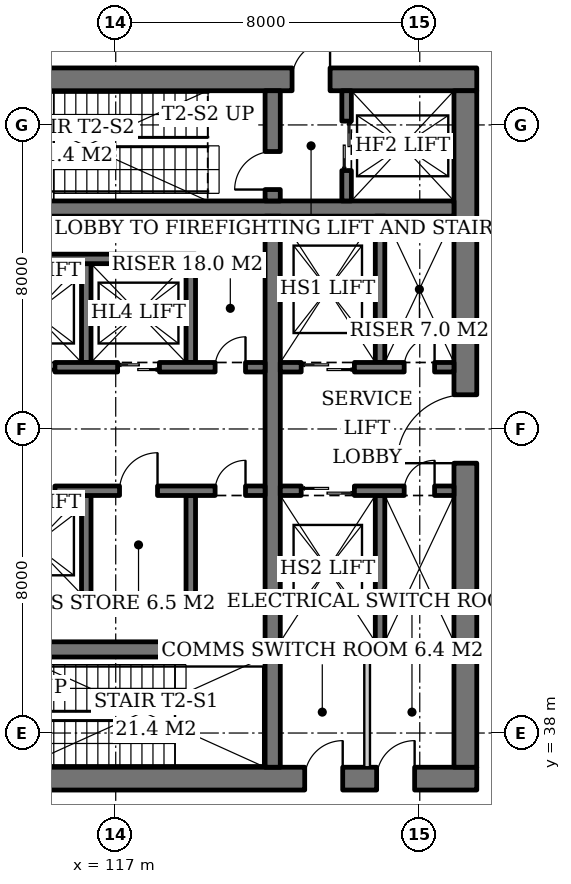
"""IFC4 building model, lengths in metres.
Left out: names, types, materials, properties, quantities, classifications, styles, units other than length and angle.
Written with IfcOpenShell. Run it as: python <this file> out.ifc"""

import sys

from ifc_helpers import new_model, si_unit, direction, frame, frame_2d, origin, place, context, subcontext, project, spatial, rectangle, extrude, element, fill, save


model = new_model("IFC4")
c1 = context("Model", 3, precision=1e-05, world=origin(), true_north=direction((0.0, 1.0)))
c2 = subcontext(c1, "Body", "Model", "MODEL_VIEW")
j1 = project(units=[si_unit("LENGTHUNIT", "METRE"), si_unit("PLANEANGLEUNIT", "RADIAN")], contexts=[c1])
p1 = place(None, origin())
s1 = spatial("IfcSite", under=j1, at=p1, CompositionType="ELEMENT")
p2 = place(p1, origin())
s2 = spatial("IfcBuilding", under=s1, at=p2, CompositionType="ELEMENT")
p3 = place(p2, frame((0.0, 0.0, -5.0)))
s3 = spatial("IfcBuildingStorey", under=s2, at=p3, CompositionType="ELEMENT", Elevation=-5.0)
p4 = place(p3, frame((107.5, 36.8, 0.0), z_axis=(0.0, 0.0, 1.0), x_axis=(1.0, 0.0, 0.0)))
e1 = element("IfcWall", 1, at=p4, inside=s3, PredefinedType="SHEAR", context=c2, shape_type="SweptSolid", body=[
    extrude(rectangle(XDim=19.0, YDim=0.6, at=frame_2d((9.5, 0.0))), origin(), (0.0, 0.0, 1.0), 5.0),
])
p5 = place(p4, frame((3.9, 0.0, 0.0)))
e2 = element("IfcOpeningElement", 2, at=p5, cuts=e1, PredefinedType="OPENING", context=c2, shape_type="SweptSolid", body=[
    extrude(rectangle(XDim=1.0, YDim=2.1, at=frame_2d((0.5, 1.05))), frame((0.0, 0.31, 0.0), z_axis=(0.0, -1.0, 0.0), x_axis=(1.0, 0.0, 0.0)), (0.0, 0.0, 1.0), 0.62),
])
p6 = place(p4, frame((14.472, 0.0, 0.0)))
e3 = element("IfcOpeningElement", 3, at=p6, cuts=e1, PredefinedType="OPENING", context=c2, shape_type="SweptSolid", body=[
    extrude(rectangle(XDim=1.0, YDim=2.1, at=frame_2d((0.5, 1.05))), frame((0.0, 0.31, 0.0), z_axis=(0.0, -1.0, 0.0), x_axis=(1.0, 0.0, 0.0)), (0.0, 0.0, 1.0), 0.62),
])
p7 = place(p4, frame((16.365, 0.0, 0.0)))
e4 = element("IfcOpeningElement", 4, at=p7, cuts=e1, PredefinedType="OPENING", context=c2, shape_type="SweptSolid", body=[
    extrude(rectangle(XDim=1.0, YDim=2.1, at=frame_2d((0.5, 1.05))), frame((0.0, 0.31, 0.0), z_axis=(0.0, -1.0, 0.0), x_axis=(1.0, 0.0, 0.0)), (0.0, 0.0, 1.0), 0.62),
])
p8 = place(p3, frame((107.5, 55.2, 0.0), z_axis=(0.0, 0.0, 1.0), x_axis=(1.0, 0.0, 0.0)))
e5 = element("IfcWall", 5, at=p8, inside=s3, PredefinedType="SHEAR", context=c2, shape_type="SweptSolid", body=[
    extrude(rectangle(XDim=19.0, YDim=0.6, at=frame_2d((9.5, 0.0))), origin(), (0.0, 0.0, 1.0), 5.0),
])
p9 = place(p8, frame((14.14, 0.0, 0.0)))
e6 = element("IfcOpeningElement", 6, at=p9, cuts=e5, PredefinedType="OPENING", context=c2, shape_type="SweptSolid", body=[
    extrude(rectangle(XDim=1.0, YDim=2.1, at=frame_2d((0.5, 1.05))), frame((0.0, 0.31, 0.0), z_axis=(0.0, -1.0, 0.0), x_axis=(1.0, 0.0, 0.0)), (0.0, 0.0, 1.0), 0.62),
])
p10 = place(p8, frame((2.425, 0.0, 0.0)))
e7 = element("IfcOpeningElement", 7, at=p10, cuts=e5, PredefinedType="OPENING", context=c2, shape_type="SweptSolid", body=[
    extrude(rectangle(XDim=1.0, YDim=2.1, at=frame_2d((0.5, 1.05))), frame((0.0, 0.31, 0.0), z_axis=(0.0, -1.0, 0.0), x_axis=(1.0, 0.0, 0.0)), (0.0, 0.0, 1.0), 0.62),
])
p11 = place(p3, frame((126.2, 37.1, 0.0), z_axis=(0.0, 0.0, 1.0), x_axis=(0.0, 1.0, 0.0)))
e8 = element("IfcWall", 8, at=p11, inside=s3, PredefinedType="SHEAR", context=c2, shape_type="SweptSolid", body=[
    extrude(rectangle(XDim=17.8, YDim=0.6, at=frame_2d((8.9, 0.0))), origin(), (0.0, 0.0, 1.0), 5.0),
])
p12 = place(p11, frame((8.0, 0.0, 0.0)))
e9 = element("IfcOpeningElement", 9, at=p12, cuts=e8, PredefinedType="OPENING", context=c2, shape_type="SweptSolid", body=[
    extrude(rectangle(XDim=1.8, YDim=2.4, at=frame_2d((0.9, 1.2))), frame((0.0, 0.31, 0.0), z_axis=(0.0, -1.0, 0.0), x_axis=(1.0, 0.0, 0.0)), (0.0, 0.0, 1.0), 0.62),
])
for number, where, z_axis, x_axis in (
    (10, (108.1, 40.2, 0.0), (0.0, 0.0, 1.0), (1.0, 0.0, 0.0)),
    (11, (108.1, 51.8, 0.0), (0.0, 0.0, 1.0), (1.0, 0.0, 0.0)),
):
    element("IfcWall", number, at=place(p3, frame(where, z_axis=z_axis, x_axis=x_axis)), inside=s3, PredefinedType="SHEAR", context=c2, shape_type="SweptSolid", body=[
        extrude(rectangle(XDim=17.8, YDim=0.4, at=frame_2d((8.9, 0.0))), origin(), (0.0, 0.0, 1.0), 5.0),
    ])
p13 = place(p3, frame((121.13, 37.1, 0.0), z_axis=(0.0, 0.0, 1.0), x_axis=(0.0, 1.0, 0.0)))
e12 = element("IfcWall", 12, at=p13, inside=s3, PredefinedType="SHEAR", context=c2, shape_type="SweptSolid", body=[
    extrude(rectangle(XDim=2.9, YDim=0.4, at=frame_2d((1.45, 0.0))), origin(), (0.0, 0.0, 1.0), 5.0),
])
p14 = place(p3, frame((121.13, 40.4, 0.0), z_axis=(0.0, 0.0, 1.0), x_axis=(0.0, 1.0, 0.0)))
e13 = element("IfcWall", 13, at=p14, inside=s3, PredefinedType="SHEAR", context=c2, shape_type="SweptSolid", body=[
    extrude(rectangle(XDim=11.2, YDim=0.4, at=frame_2d((5.6, 0.0))), origin(), (0.0, 0.0, 1.0), 5.0),
])
p15 = place(p3, frame((121.13, 52.0, 0.0), z_axis=(0.0, 0.0, 1.0), x_axis=(0.0, 1.0, 0.0)))
e14 = element("IfcWall", 14, at=p15, inside=s3, PredefinedType="SHEAR", context=c2, shape_type="SweptSolid", body=[
    extrude(rectangle(XDim=2.9, YDim=0.4, at=frame_2d((1.45, 0.0))), origin(), (0.0, 0.0, 1.0), 5.0),
])
p16 = place(p15, frame((0.3, 0.0, 0.0)))
e15 = element("IfcOpeningElement", 15, at=p16, cuts=e14, PredefinedType="OPENING", context=c2, shape_type="SweptSolid", body=[
    extrude(rectangle(XDim=1.0, YDim=2.1, at=frame_2d((0.5, 1.05))), frame((0.0, 0.21, 0.0), z_axis=(0.0, -1.0, 0.0), x_axis=(1.0, 0.0, 0.0)), (0.0, 0.0, 1.0), 0.42),
])
p17 = place(p3, frame((123.075, 52.0, 0.0), z_axis=(0.0, 0.0, 1.0), x_axis=(0.0, 1.0, 0.0)))
e16 = element("IfcWall", 16, at=p17, inside=s3, PredefinedType="SHEAR", context=c2, shape_type="SweptSolid", body=[
    extrude(rectangle(XDim=2.9, YDim=0.25, at=frame_2d((1.45, 0.0))), origin(), (0.0, 0.0, 1.0), 5.0),
])
p18 = place(p17, frame((0.8, 0.0, 0.0)))
e17 = element("IfcOpeningElement", 17, at=p18, cuts=e16, PredefinedType="OPENING", context=c2, shape_type="SweptSolid", body=[
    extrude(rectangle(XDim=1.3, YDim=2.2, at=frame_2d((0.65, 1.1))), frame((0.0, 0.135, 0.0), z_axis=(0.0, -1.0, 0.0), x_axis=(1.0, 0.0, 0.0)), (0.0, 0.0, 1.0), 0.27),
])
for number, where, z_axis, x_axis in (
    (18, (116.225, 47.75, 0.0), (0.0, 0.0, 1.0), (0.0, 1.0, 0.0)),
    (19, (118.975, 47.75, 0.0), (0.0, 0.0, 1.0), (0.0, 1.0, 0.0)),
):
    element("IfcWall", number, at=place(p3, frame(where, z_axis=z_axis, x_axis=x_axis)), inside=s3, PredefinedType="SHEAR", context=c2, shape_type="SweptSolid", body=[
        extrude(rectangle(XDim=2.6, YDim=0.25, at=frame_2d((1.3, 0.0))), origin(), (0.0, 0.0, 1.0), 5.0),
    ])
p19 = place(p3, frame((108.1, 50.475, 0.0), z_axis=(0.0, 0.0, 1.0), x_axis=(1.0, 0.0, 0.0)))
e20 = element("IfcWall", 20, at=p19, inside=s3, PredefinedType="SHEAR", context=c2, shape_type="SweptSolid", body=[
    extrude(rectangle(XDim=11.0, YDim=0.25, at=frame_2d((5.5, 0.0))), origin(), (0.0, 0.0, 1.0), 5.0),
])
p20 = place(p3, frame((108.1, 47.625, 0.0), z_axis=(0.0, 0.0, 1.0), x_axis=(1.0, 0.0, 0.0)))
e21 = element("IfcWall", 21, at=p20, inside=s3, PredefinedType="SHEAR", context=c2, shape_type="SweptSolid", body=[
    extrude(rectangle(XDim=12.83, YDim=0.25, at=frame_2d((6.415, 0.0))), origin(), (0.0, 0.0, 1.0), 5.0),
])
p21 = place(p20, frame((0.7, 0.0, 0.0)))
e22 = element("IfcOpeningElement", 22, at=p21, cuts=e21, PredefinedType="OPENING", context=c2, shape_type="SweptSolid", body=[
    extrude(rectangle(XDim=1.1, YDim=2.2, at=frame_2d((0.55, 1.1))), frame((0.0, 0.135, 0.0), z_axis=(0.0, -1.0, 0.0), x_axis=(1.0, 0.0, 0.0)), (0.0, 0.0, 1.0), 0.27),
])
p22 = place(p20, frame((3.45, 0.0, 0.0)))
e23 = element("IfcOpeningElement", 23, at=p22, cuts=e21, PredefinedType="OPENING", context=c2, shape_type="SweptSolid", body=[
    extrude(rectangle(XDim=1.1, YDim=2.2, at=frame_2d((0.55, 1.1))), frame((0.0, 0.135, 0.0), z_axis=(0.0, -1.0, 0.0), x_axis=(1.0, 0.0, 0.0)), (0.0, 0.0, 1.0), 0.27),
])
p23 = place(p20, frame((6.2, 0.0, 0.0)))
e24 = element("IfcOpeningElement", 24, at=p23, cuts=e21, PredefinedType="OPENING", context=c2, shape_type="SweptSolid", body=[
    extrude(rectangle(XDim=1.1, YDim=2.2, at=frame_2d((0.55, 1.1))), frame((0.0, 0.135, 0.0), z_axis=(0.0, -1.0, 0.0), x_axis=(1.0, 0.0, 0.0)), (0.0, 0.0, 1.0), 0.27),
])
p24 = place(p20, frame((8.95, 0.0, 0.0)))
e25 = element("IfcOpeningElement", 25, at=p24, cuts=e21, PredefinedType="OPENING", context=c2, shape_type="SweptSolid", body=[
    extrude(rectangle(XDim=1.1, YDim=2.2, at=frame_2d((0.55, 1.1))), frame((0.0, 0.135, 0.0), z_axis=(0.0, -1.0, 0.0), x_axis=(1.0, 0.0, 0.0)), (0.0, 0.0, 1.0), 0.27),
])
p25 = place(p20, frame((11.515, 0.0, 0.0)))
e26 = element("IfcOpeningElement", 26, at=p25, cuts=e21, PredefinedType="OPENING", context=c2, shape_type="SweptSolid", body=[
    extrude(rectangle(XDim=0.8, YDim=2.0, at=frame_2d((0.4, 1.0))), frame((0.0, 0.135, 0.0), z_axis=(0.0, -1.0, 0.0), x_axis=(1.0, 0.0, 0.0)), (0.0, 0.0, 1.0), 0.27),
])
for number, where, z_axis, x_axis in (
    (27, (116.225, 44.25, 0.0), (0.0, 0.0, 1.0), (0.0, -1.0, 0.0)),
    (28, (118.975, 44.25, 0.0), (0.0, 0.0, 1.0), (0.0, -1.0, 0.0)),
):
    element("IfcWall", number, at=place(p3, frame(where, z_axis=z_axis, x_axis=x_axis)), inside=s3, PredefinedType="SHEAR", context=c2, shape_type="SweptSolid", body=[
        extrude(rectangle(XDim=2.6, YDim=0.25, at=frame_2d((1.3, 0.0))), origin(), (0.0, 0.0, 1.0), 5.0),
    ])
p26 = place(p3, frame((108.1, 41.525, 0.0), z_axis=(0.0, 0.0, 1.0), x_axis=(1.0, 0.0, 0.0)))
e29 = element("IfcWall", 29, at=p26, inside=s3, PredefinedType="SHEAR", context=c2, shape_type="SweptSolid", body=[
    extrude(rectangle(XDim=11.0, YDim=0.25, at=frame_2d((5.5, 0.0))), origin(), (0.0, 0.0, 1.0), 5.0),
])
p27 = place(p3, frame((108.1, 44.375, 0.0), z_axis=(0.0, 0.0, 1.0), x_axis=(1.0, 0.0, 0.0)))
e30 = element("IfcWall", 30, at=p27, inside=s3, PredefinedType="SHEAR", context=c2, shape_type="SweptSolid", body=[
    extrude(rectangle(XDim=12.83, YDim=0.25, at=frame_2d((6.415, 0.0))), origin(), (0.0, 0.0, 1.0), 5.0),
])
p28 = place(p27, frame((0.7, 0.0, 0.0)))
e31 = element("IfcOpeningElement", 31, at=p28, cuts=e30, PredefinedType="OPENING", context=c2, shape_type="SweptSolid", body=[
    extrude(rectangle(XDim=1.1, YDim=2.2, at=frame_2d((0.55, 1.1))), frame((0.0, 0.135, 0.0), z_axis=(0.0, -1.0, 0.0), x_axis=(1.0, 0.0, 0.0)), (0.0, 0.0, 1.0), 0.27),
])
p29 = place(p27, frame((3.45, 0.0, 0.0)))
e32 = element("IfcOpeningElement", 32, at=p29, cuts=e30, PredefinedType="OPENING", context=c2, shape_type="SweptSolid", body=[
    extrude(rectangle(XDim=1.1, YDim=2.2, at=frame_2d((0.55, 1.1))), frame((0.0, 0.135, 0.0), z_axis=(0.0, -1.0, 0.0), x_axis=(1.0, 0.0, 0.0)), (0.0, 0.0, 1.0), 0.27),
])
p30 = place(p27, frame((6.2, 0.0, 0.0)))
e33 = element("IfcOpeningElement", 33, at=p30, cuts=e30, PredefinedType="OPENING", context=c2, shape_type="SweptSolid", body=[
    extrude(rectangle(XDim=1.1, YDim=2.2, at=frame_2d((0.55, 1.1))), frame((0.0, 0.135, 0.0), z_axis=(0.0, -1.0, 0.0), x_axis=(1.0, 0.0, 0.0)), (0.0, 0.0, 1.0), 0.27),
])
p31 = place(p27, frame((9.0, 0.0, 0.0)))
e34 = element("IfcOpeningElement", 34, at=p31, cuts=e30, PredefinedType="OPENING", context=c2, shape_type="SweptSolid", body=[
    extrude(rectangle(XDim=1.0, YDim=2.1, at=frame_2d((0.5, 1.05))), frame((0.0, 0.135, 0.0), z_axis=(0.0, -1.0, 0.0), x_axis=(1.0, 0.0, 0.0)), (0.0, 0.0, 1.0), 0.27),
])
p32 = place(p27, frame((11.515, 0.0, 0.0)))
e35 = element("IfcOpeningElement", 35, at=p32, cuts=e30, PredefinedType="OPENING", context=c2, shape_type="SweptSolid", body=[
    extrude(rectangle(XDim=0.8, YDim=2.0, at=frame_2d((0.4, 1.0))), frame((0.0, 0.135, 0.0), z_axis=(0.0, -1.0, 0.0), x_axis=(1.0, 0.0, 0.0)), (0.0, 0.0, 1.0), 0.27),
])
p33 = place(p3, frame((123.955, 47.75, 0.0), z_axis=(0.0, 0.0, 1.0), x_axis=(0.0, 1.0, 0.0)))
e36 = element("IfcWall", 36, at=p33, inside=s3, PredefinedType="SHEAR", context=c2, shape_type="SweptSolid", body=[
    extrude(rectangle(XDim=3.85, YDim=0.25, at=frame_2d((1.925, 0.0))), origin(), (0.0, 0.0, 1.0), 5.0),
])
p34 = place(p3, frame((121.33, 47.625, 0.0), z_axis=(0.0, 0.0, 1.0), x_axis=(1.0, 0.0, 0.0)))
e37 = element("IfcWall", 37, at=p34, inside=s3, PredefinedType="SHEAR", context=c2, shape_type="SweptSolid", body=[
    extrude(rectangle(XDim=4.57, YDim=0.25, at=frame_2d((2.285, 0.0))), origin(), (0.0, 0.0, 1.0), 5.0),
])
p35 = place(p34, frame((0.55, 0.0, 0.0)))
e38 = element("IfcOpeningElement", 38, at=p35, cuts=e37, PredefinedType="OPENING", context=c2, shape_type="SweptSolid", body=[
    extrude(rectangle(XDim=1.4, YDim=2.4, at=frame_2d((0.7, 1.2))), frame((0.0, 0.135, 0.0), z_axis=(0.0, -1.0, 0.0), x_axis=(1.0, 0.0, 0.0)), (0.0, 0.0, 1.0), 0.27),
])
p36 = place(p34, frame((3.26, 0.0, 0.0)))
e39 = element("IfcOpeningElement", 39, at=p36, cuts=e37, PredefinedType="OPENING", context=c2, shape_type="SweptSolid", body=[
    extrude(rectangle(XDim=0.8, YDim=2.0, at=frame_2d((0.4, 1.0))), frame((0.0, 0.135, 0.0), z_axis=(0.0, -1.0, 0.0), x_axis=(1.0, 0.0, 0.0)), (0.0, 0.0, 1.0), 0.27),
])
p37 = place(p3, frame((123.955, 44.25, 0.0), z_axis=(0.0, 0.0, 1.0), x_axis=(0.0, -1.0, 0.0)))
e40 = element("IfcWall", 40, at=p37, inside=s3, PredefinedType="SHEAR", context=c2, shape_type="SweptSolid", body=[
    extrude(rectangle(XDim=3.85, YDim=0.25, at=frame_2d((1.925, 0.0))), origin(), (0.0, 0.0, 1.0), 5.0),
])
p38 = place(p3, frame((121.33, 44.375, 0.0), z_axis=(0.0, 0.0, 1.0), x_axis=(1.0, 0.0, 0.0)))
e41 = element("IfcWall", 41, at=p38, inside=s3, PredefinedType="SHEAR", context=c2, shape_type="SweptSolid", body=[
    extrude(rectangle(XDim=4.57, YDim=0.25, at=frame_2d((2.285, 0.0))), origin(), (0.0, 0.0, 1.0), 5.0),
])
p39 = place(p38, frame((0.55, 0.0, 0.0)))
e42 = element("IfcOpeningElement", 42, at=p39, cuts=e41, PredefinedType="OPENING", context=c2, shape_type="SweptSolid", body=[
    extrude(rectangle(XDim=1.4, YDim=2.4, at=frame_2d((0.7, 1.2))), frame((0.0, 0.135, 0.0), z_axis=(0.0, -1.0, 0.0), x_axis=(1.0, 0.0, 0.0)), (0.0, 0.0, 1.0), 0.27),
])
p40 = place(p38, frame((3.26, 0.0, 0.0)))
e43 = element("IfcOpeningElement", 43, at=p40, cuts=e41, PredefinedType="OPENING", context=c2, shape_type="SweptSolid", body=[
    extrude(rectangle(XDim=0.8, YDim=2.0, at=frame_2d((0.4, 1.0))), frame((0.0, 0.135, 0.0), z_axis=(0.0, -1.0, 0.0), x_axis=(1.0, 0.0, 0.0)), (0.0, 0.0, 1.0), 0.27),
])
p41 = place(p3, frame((123.615, 37.1, 0.0), z_axis=(0.0, 0.0, 1.0), x_axis=(0.0, 1.0, 0.0)))
e44 = element("IfcWall", 44, at=p41, inside=s3, PredefinedType="SOLIDWALL", context=c2, shape_type="SweptSolid", body=[
    extrude(rectangle(XDim=2.9, YDim=0.15, at=frame_2d((1.45, 0.0))), origin(), (0.0, 0.0, 1.0), 4.7),
])
p42 = place(p18, origin())
e45 = element("IfcDoor", 45, at=p42, inside=s3, OperationType="DOUBLE_DOOR_SLIDING", PredefinedType="DOOR", context=c2, shape_type="SweptSolid", body=[
    extrude(rectangle(XDim=1.3, YDim=2.2, at=frame_2d((0.65, 1.1))), frame((0.0, 0.025, 0.0), z_axis=(0.0, -1.0, 0.0), x_axis=(1.0, 0.0, 0.0)), (0.0, 0.0, 1.0), 0.05),
])
fill(e17, e45)
p43 = place(p23, origin())
e46 = element("IfcDoor", 46, at=p43, inside=s3, OperationType="DOUBLE_DOOR_SLIDING", PredefinedType="DOOR", context=c2, shape_type="SweptSolid", body=[
    extrude(rectangle(XDim=1.1, YDim=2.2, at=frame_2d((0.55, 1.1))), frame((0.0, 0.025, 0.0), z_axis=(0.0, -1.0, 0.0), x_axis=(1.0, 0.0, 0.0)), (0.0, 0.0, 1.0), 0.05),
])
fill(e24, e46)
p44 = place(p24, origin())
e47 = element("IfcDoor", 47, at=p44, inside=s3, OperationType="DOUBLE_DOOR_SLIDING", PredefinedType="DOOR", context=c2, shape_type="SweptSolid", body=[
    extrude(rectangle(XDim=1.1, YDim=2.2, at=frame_2d((0.55, 1.1))), frame((0.0, 0.025, 0.0), z_axis=(0.0, -1.0, 0.0), x_axis=(1.0, 0.0, 0.0)), (0.0, 0.0, 1.0), 0.05),
])
fill(e25, e47)
p45 = place(p25, origin())
e48 = element("IfcDoor", 48, at=p45, inside=s3, OperationType="SINGLE_SWING_RIGHT", PredefinedType="DOOR", context=c2, shape_type="SweptSolid", body=[
    extrude(rectangle(XDim=0.8, YDim=2.0, at=frame_2d((0.4, 1.0))), frame((0.0, 0.025, 0.0), z_axis=(0.0, -1.0, 0.0), x_axis=(1.0, 0.0, 0.0)), (0.0, 0.0, 1.0), 0.05),
])
fill(e26, e48)
p46 = place(p30, origin())
e49 = element("IfcDoor", 49, at=p46, inside=s3, OperationType="DOUBLE_DOOR_SLIDING", PredefinedType="DOOR", context=c2, shape_type="SweptSolid", body=[
    extrude(rectangle(XDim=1.1, YDim=2.2, at=frame_2d((0.55, 1.1))), frame((0.0, 0.025, 0.0), z_axis=(0.0, -1.0, 0.0), x_axis=(1.0, 0.0, 0.0)), (0.0, 0.0, 1.0), 0.05),
])
fill(e33, e49)
p47 = place(p31, origin())
e50 = element("IfcDoor", 50, at=p47, inside=s3, OperationType="SINGLE_SWING_RIGHT", PredefinedType="DOOR", context=c2, shape_type="SweptSolid", body=[
    extrude(rectangle(XDim=1.0, YDim=2.1, at=frame_2d((0.5, 1.05))), frame((0.0, 0.025, 0.0), z_axis=(0.0, -1.0, 0.0), x_axis=(1.0, 0.0, 0.0)), (0.0, 0.0, 1.0), 0.05),
])
fill(e34, e50)
p48 = place(p32, origin())
e51 = element("IfcDoor", 51, at=p48, inside=s3, OperationType="SINGLE_SWING_RIGHT", PredefinedType="DOOR", context=c2, shape_type="SweptSolid", body=[
    extrude(rectangle(XDim=0.8, YDim=2.0, at=frame_2d((0.4, 1.0))), frame((0.0, 0.025, 0.0), z_axis=(0.0, -1.0, 0.0), x_axis=(1.0, 0.0, 0.0)), (0.0, 0.0, 1.0), 0.05),
])
fill(e35, e51)
p49 = place(p35, origin())
e52 = element("IfcDoor", 52, at=p49, inside=s3, OperationType="DOUBLE_DOOR_SLIDING", PredefinedType="DOOR", context=c2, shape_type="SweptSolid", body=[
    extrude(rectangle(XDim=1.4, YDim=2.4, at=frame_2d((0.7, 1.2))), frame((0.0, 0.025, 0.0), z_axis=(0.0, -1.0, 0.0), x_axis=(1.0, 0.0, 0.0)), (0.0, 0.0, 1.0), 0.05),
])
fill(e38, e52)
p50 = place(p36, origin())
e53 = element("IfcDoor", 53, at=p50, inside=s3, OperationType="SINGLE_SWING_RIGHT", PredefinedType="DOOR", context=c2, shape_type="SweptSolid", body=[
    extrude(rectangle(XDim=0.8, YDim=2.0, at=frame_2d((0.4, 1.0))), frame((0.0, 0.025, 0.0), z_axis=(0.0, -1.0, 0.0), x_axis=(1.0, 0.0, 0.0)), (0.0, 0.0, 1.0), 0.05),
])
fill(e39, e53)
p51 = place(p39, origin())
e54 = element("IfcDoor", 54, at=p51, inside=s3, OperationType="DOUBLE_DOOR_SLIDING", PredefinedType="DOOR", context=c2, shape_type="SweptSolid", body=[
    extrude(rectangle(XDim=1.4, YDim=2.4, at=frame_2d((0.7, 1.2))), frame((0.0, 0.025, 0.0), z_axis=(0.0, -1.0, 0.0), x_axis=(1.0, 0.0, 0.0)), (0.0, 0.0, 1.0), 0.05),
])
fill(e42, e54)
p52 = place(p40, origin())
e55 = element("IfcDoor", 55, at=p52, inside=s3, OperationType="SINGLE_SWING_RIGHT", PredefinedType="DOOR", context=c2, shape_type="SweptSolid", body=[
    extrude(rectangle(XDim=0.8, YDim=2.0, at=frame_2d((0.4, 1.0))), frame((0.0, 0.025, 0.0), z_axis=(0.0, -1.0, 0.0), x_axis=(1.0, 0.0, 0.0)), (0.0, 0.0, 1.0), 0.05),
])
fill(e43, e55)
p53 = place(p16, origin())
e56 = element("IfcDoor", 56, at=p53, inside=s3, OperationType="SINGLE_SWING_LEFT", PredefinedType="DOOR", context=c2, shape_type="SweptSolid", body=[
    extrude(rectangle(XDim=1.0, YDim=2.1, at=frame_2d((0.5, 1.05))), frame((0.0, 0.025, 0.0), z_axis=(0.0, -1.0, 0.0), x_axis=(1.0, 0.0, 0.0)), (0.0, 0.0, 1.0), 0.05),
])
fill(e15, e56)
p54 = place(p9, origin())
e57 = element("IfcDoor", 57, at=p54, inside=s3, OperationType="SINGLE_SWING_RIGHT", PredefinedType="DOOR", context=c2, shape_type="SweptSolid", body=[
    extrude(rectangle(XDim=1.0, YDim=2.1, at=frame_2d((0.5, 1.05))), frame((0.0, 0.025, 0.0), z_axis=(0.0, -1.0, 0.0), x_axis=(1.0, 0.0, 0.0)), (0.0, 0.0, 1.0), 0.05),
])
fill(e6, e57)
p55 = place(p12, origin())
e58 = element("IfcDoor", 58, at=p55, inside=s3, OperationType="DOUBLE_DOOR_SINGLE_SWING", PredefinedType="DOOR", context=c2, shape_type="SweptSolid", body=[
    extrude(rectangle(XDim=1.8, YDim=2.4, at=frame_2d((0.9, 1.2))), frame((0.0, 0.025, 0.0), z_axis=(0.0, -1.0, 0.0), x_axis=(1.0, 0.0, 0.0)), (0.0, 0.0, 1.0), 0.05),
])
fill(e9, e58)
p56 = place(p6, origin())
e59 = element("IfcDoor", 59, at=p56, inside=s3, OperationType="SINGLE_SWING_RIGHT", PredefinedType="DOOR", context=c2, shape_type="SweptSolid", body=[
    extrude(rectangle(XDim=1.0, YDim=2.1, at=frame_2d((0.5, 1.05))), frame((0.0, 0.29, 0.0), z_axis=(0.0, -1.0, 0.0), x_axis=(1.0, 0.0, 0.0)), (0.0, 0.0, 1.0), 0.05),
])
fill(e3, e59)
p57 = place(p7, origin())
e60 = element("IfcDoor", 60, at=p57, inside=s3, OperationType="SINGLE_SWING_RIGHT", PredefinedType="DOOR", context=c2, shape_type="SweptSolid", body=[
    extrude(rectangle(XDim=1.0, YDim=2.1, at=frame_2d((0.5, 1.05))), frame((0.0, 0.29, 0.0), z_axis=(0.0, -1.0, 0.0), x_axis=(1.0, 0.0, 0.0)), (0.0, 0.0, 1.0), 0.05),
])
fill(e4, e60)
save(model, sys.argv[1])
